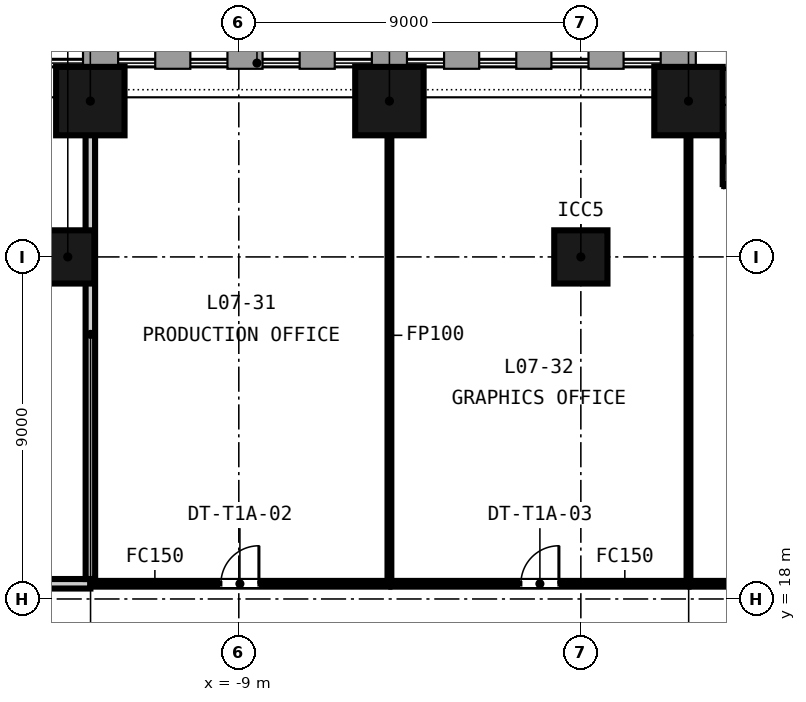
"""IFC4 building model, lengths in metres.
Left out: names, types, materials, properties, quantities, classifications, styles, units other than length and angle.
Written with IfcOpenShell. Run it as: python <this file> out.ifc"""

import sys

from ifc_helpers import new_model, si_unit, direction, frame, frame_2d, origin, origin_2d, place, context, subcontext, project, spatial, rectangle, extrude, element, fill, save


model = new_model("IFC4")
c1 = context("Model", 3, precision=1e-05, world=origin(), true_north=direction((0.0, 1.0)))
c2 = subcontext(c1, "Body", "Model", "MODEL_VIEW")
j1 = project(units=[si_unit("LENGTHUNIT", "METRE"), si_unit("PLANEANGLEUNIT", "RADIAN")], contexts=[c1])
p1 = place(None, origin())
s1 = spatial("IfcSite", under=j1, at=p1, CompositionType="ELEMENT")
p2 = place(p1, origin())
s2 = spatial("IfcBuilding", under=s1, at=p2, CompositionType="ELEMENT")
p3 = place(p2, frame((0.0, 0.0, 39.65)))
s3 = spatial("IfcBuildingStorey", under=s2, at=p3, CompositionType="ELEMENT", Elevation=39.65)
for number, where, z_axis, x_axis in (
    (1, (2.832, 31.1, -0.15), (0.0, 0.0, 1.0), (-1.0, 0.0, 0.0)),
    (2, (-5.037, 31.1, -0.15), (0.0, 0.0, 1.0), (-1.0, 0.0, 0.0)),
    (3, (-12.907, 31.1, -0.15), (0.0, 0.0, 1.0), (-1.0, 0.0, 0.0)),
):
    element("IfcColumn", number, at=place(p3, frame(where, z_axis=z_axis, x_axis=x_axis)), inside=s3, PredefinedType="COLUMN", context=c2, shape_type="SweptSolid", body=[
        extrude(rectangle(XDim=1.8, YDim=1.8, at=origin_2d()), origin(), (0.0, 0.0, 1.0), 3.65),
    ])
for number, where, z_axis, x_axis in (
    (4, (-13.5, 27.0, -0.15), (0.0, 0.0, 1.0), (1.0, 0.0, 0.0)),
    (5, (0.0, 27.0, -0.15), (0.0, 0.0, 1.0), (1.0, 0.0, 0.0)),
):
    element("IfcColumn", number, at=place(p3, frame(where, z_axis=z_axis, x_axis=x_axis)), inside=s3, PredefinedType="COLUMN", context=c2, shape_type="SweptSolid", body=[
        extrude(rectangle(XDim=1.4, YDim=1.4, at=origin_2d()), origin(), (0.0, 0.0, 1.0), 3.65),
    ])
p4 = place(p3, frame((3.832, 30.2, 0.0), z_axis=(0.0, 0.0, 1.0), x_axis=(0.0, -1.0, 0.0)))
e6 = element("IfcWall", 6, at=p4, inside=s3, PredefinedType="SOLIDWALL", context=c2, shape_type="SweptSolid", body=[
    extrude(rectangle(XDim=1.284, YDim=0.2, at=frame_2d((0.642, 0.0))), origin(), (0.0, 0.0, 1.0), 3.05),
])
p5 = place(p3, frame((-18.275, 18.4, 0.0), z_axis=(0.0, 0.0, 1.0), x_axis=(1.0, 0.0, 0.0)))
e7 = element("IfcWall", 7, at=p5, inside=s3, PredefinedType="PARTITIONING", context=c2, shape_type="SweptSolid", body=[
    extrude(rectangle(XDim=5.37, YDim=0.25, at=frame_2d((2.685, 0.0))), origin(), (0.0, 0.0, 1.0), 2.741),
])
p6 = place(p5, frame((1.785, 0.0, 0.0)))
e8 = element("IfcOpeningElement", 8, at=p6, cuts=e7, PredefinedType="OPENING", context=c2, shape_type="SweptSolid", body=[
    extrude(rectangle(XDim=1.8, YDim=2.1, at=frame_2d((0.9, 1.05))), frame((0.0, 0.135, 0.0), z_axis=(0.0, -1.0, 0.0), x_axis=(1.0, 0.0, 0.0)), (0.0, 0.0, 1.0), 0.27),
])
p7 = place(p3, frame((-12.905, 18.4, 0.0), z_axis=(0.0, 0.0, 1.0), x_axis=(1.0, 0.0, 0.0)))
e9 = element("IfcWall", 9, at=p7, inside=s3, PredefinedType="PARTITIONING", context=c2, shape_type="SweptSolid", body=[
    extrude(rectangle(XDim=7.868, YDim=0.15, at=frame_2d((3.934, 0.0))), origin(), (0.0, 0.0, 1.0), 2.741),
])
p8 = place(p7, frame((3.434, 0.0, 0.0)))
e10 = element("IfcOpeningElement", 10, at=p8, cuts=e9, PredefinedType="OPENING", context=c2, shape_type="SweptSolid", body=[
    extrude(rectangle(XDim=1.0, YDim=2.1, at=frame_2d((0.5, 1.05))), frame((0.0, 0.085, 0.0), z_axis=(0.0, -1.0, 0.0), x_axis=(1.0, 0.0, 0.0)), (0.0, 0.0, 1.0), 0.17),
])
p9 = place(p3, frame((-12.907, 31.4, 0.0), z_axis=(0.0, 0.0, 1.0), x_axis=(0.000151699027, -0.999999988494, 0.0)))
e11 = element("IfcWall", 11, at=p9, inside=s3, PredefinedType="PARTITIONING", context=c2, shape_type="SweptSolid", body=[
    extrude(rectangle(XDim=12.875, YDim=0.25, at=frame_2d((6.438, 0.0))), origin(), (0.0, 0.0, 1.0), 2.741),
])
p10 = place(p3, frame((-5.037, 18.475, 0.0), z_axis=(0.0, 0.0, 1.0), x_axis=(0.0, 1.0, 0.0)))
e12 = element("IfcWall", 12, at=p10, inside=s3, PredefinedType="PARTITIONING", context=c2, shape_type="SweptSolid", body=[
    extrude(rectangle(XDim=12.925, YDim=0.1, at=frame_2d((6.462, 0.0))), origin(), (0.0, 0.0, 1.0), 2.741),
])
p11 = place(p3, frame((-4.987, 18.4, 0.0), z_axis=(0.0, 0.0, 1.0), x_axis=(1.0, 0.0, 0.0)))
e13 = element("IfcWall", 13, at=p11, inside=s3, PredefinedType="PARTITIONING", context=c2, shape_type="SweptSolid", body=[
    extrude(rectangle(XDim=7.819, YDim=0.15, at=frame_2d((3.91, 0.0))), origin(), (0.0, 0.0, 1.0), 2.741),
])
p12 = place(p11, frame((3.409, 0.0, 0.0)))
e14 = element("IfcOpeningElement", 14, at=p12, cuts=e13, PredefinedType="OPENING", context=c2, shape_type="SweptSolid", body=[
    extrude(rectangle(XDim=1.0, YDim=2.1, at=frame_2d((0.5, 1.05))), frame((0.0, 0.085, 0.0), z_axis=(0.0, -1.0, 0.0), x_axis=(1.0, 0.0, 0.0)), (0.0, 0.0, 1.0), 0.17),
])
p13 = place(p3, frame((2.832, 18.475, 0.0), z_axis=(0.0, 0.0, 1.0), x_axis=(0.0, 1.0, 0.0)))
e15 = element("IfcWall", 15, at=p13, inside=s3, PredefinedType="PARTITIONING", context=c2, shape_type="SweptSolid", body=[
    extrude(rectangle(XDim=12.925, YDim=0.1, at=frame_2d((6.462, 0.0))), origin(), (0.0, 0.0, 1.0), 2.741),
])
p14 = place(p3, frame((2.882, 18.4, 0.0), z_axis=(0.0, 0.0, 1.0), x_axis=(1.0, 0.0, 0.0)))
e16 = element("IfcWall", 16, at=p14, inside=s3, PredefinedType="PARTITIONING", context=c2, shape_type="SweptSolid", body=[
    extrude(rectangle(XDim=5.618, YDim=0.15, at=frame_2d((2.809, 0.0))), origin(), (0.0, 0.0, 1.0), 2.741),
])
p15 = place(p8, origin())
e17 = element("IfcDoor", 17, at=p15, inside=s3, OperationType="SINGLE_SWING_RIGHT", PredefinedType="DOOR", context=c2, shape_type="SweptSolid", body=[
    extrude(rectangle(XDim=1.0, YDim=2.1, at=frame_2d((0.5, 1.05))), frame((0.0, 0.025, 0.0), z_axis=(0.0, -1.0, 0.0), x_axis=(1.0, 0.0, 0.0)), (0.0, 0.0, 1.0), 0.05),
])
fill(e10, e17)
p16 = place(p12, origin())
e18 = element("IfcDoor", 18, at=p16, inside=s3, OperationType="SINGLE_SWING_RIGHT", PredefinedType="DOOR", context=c2, shape_type="SweptSolid", body=[
    extrude(rectangle(XDim=1.0, YDim=2.1, at=frame_2d((0.5, 1.05))), frame((0.0, 0.025, 0.0), z_axis=(0.0, -1.0, 0.0), x_axis=(1.0, 0.0, 0.0)), (0.0, 0.0, 1.0), 0.05),
])
fill(e14, e18)
save(model, sys.argv[1])
